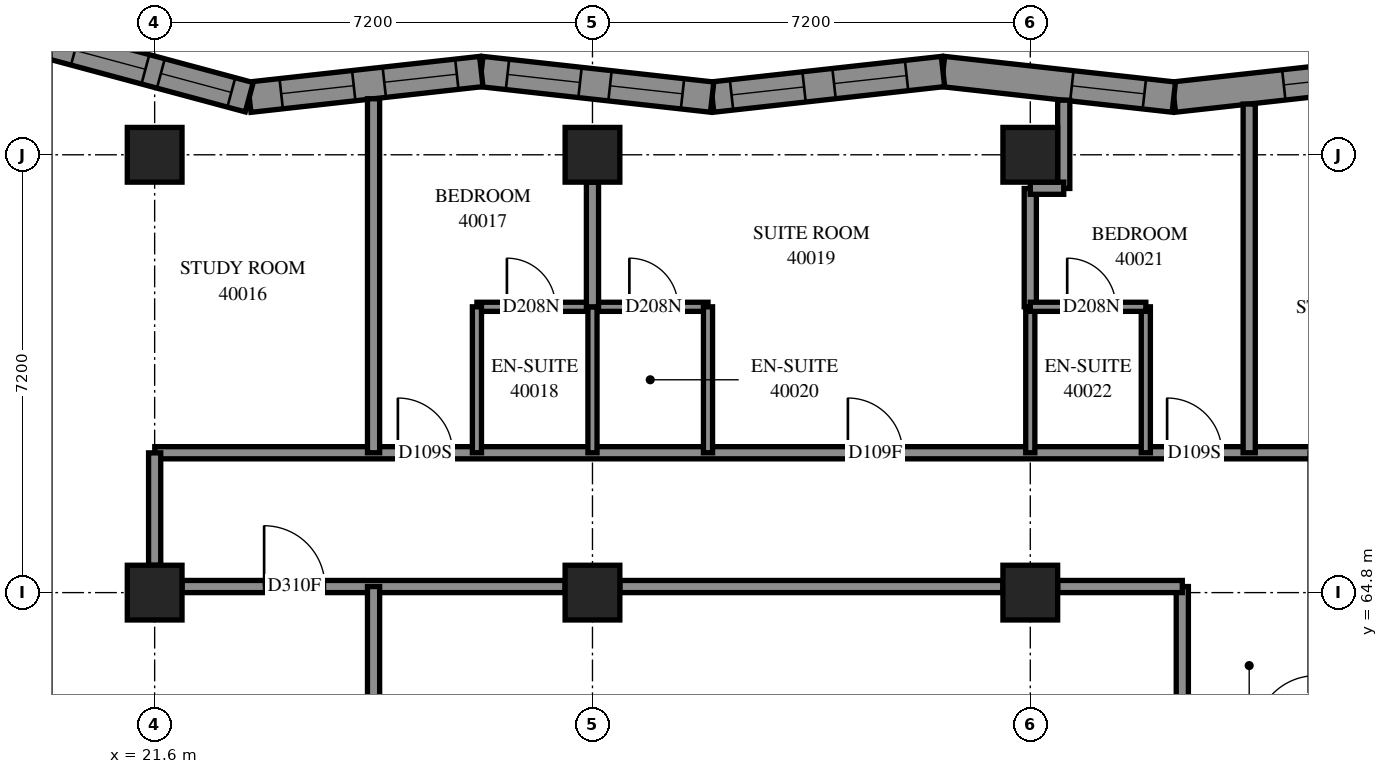
"""IFC4 building model, lengths in metres.
Left out: names, types, materials, properties, quantities, classifications, styles, units other than length and angle.
Written with IfcOpenShell. Run it as: python <this file> out.ifc"""

import sys

from ifc_helpers import new_model, si_unit, direction, frame, frame_2d, origin, origin_2d, place, context, subcontext, project, spatial, polyline, rectangle, outline, extrude, element, fill, save


model = new_model("IFC4")
c1 = context("Model", 3, precision=1e-05, world=origin(), true_north=direction((0.0, 1.0)))
c2 = subcontext(c1, "Body", "Model", "MODEL_VIEW")
j1 = project(units=[si_unit("LENGTHUNIT", "METRE"), si_unit("PLANEANGLEUNIT", "RADIAN")], contexts=[c1])
p1 = place(None, origin())
s1 = spatial("IfcSite", under=j1, at=p1, CompositionType="ELEMENT")
p2 = place(p1, origin())
s2 = spatial("IfcBuilding", under=s1, at=p2, CompositionType="ELEMENT")
p3 = place(p2, frame((0.0, 0.0, 149.0)))
s3 = spatial("IfcBuildingStorey", under=s2, at=p3, CompositionType="ELEMENT", Elevation=149.0)
for number, where, z_axis, x_axis in (
    (1, (21.6, 64.8, 0.0), (0.0, 0.0, 1.0), (1.0, 0.0, 0.0)),
    (2, (21.6, 72.0, 0.0), (0.0, 0.0, 1.0), (1.0, 0.0, 0.0)),
    (3, (28.8, 64.8, 0.0), (0.0, 0.0, 1.0), (1.0, 0.0, 0.0)),
    (4, (28.8, 72.0, 0.0), (0.0, 0.0, 1.0), (1.0, 0.0, 0.0)),
    (5, (36.0, 64.8, 0.0), (0.0, 0.0, 1.0), (1.0, 0.0, 0.0)),
    (6, (36.0, 72.0, 0.0), (0.0, 0.0, 1.0), (1.0, 0.0, 0.0)),
):
    element("IfcColumn", number, at=place(p3, frame(where, z_axis=z_axis, x_axis=x_axis)), inside=s3, PredefinedType="COLUMN", context=c2, shape_type="SweptSolid", body=[
        extrude(rectangle(XDim=0.9, YDim=0.9, at=origin_2d()), origin(), (0.0, 0.0, 1.0), 3.1),
    ])
p4 = place(p3, frame((42.157, 73.37, 0.0), z_axis=(0.0, 0.0, 1.0), x_axis=(-0.99390702, -0.1102217568, 0.0)))
e7 = element("IfcWall", 7, at=p4, inside=s3, PredefinedType="SOLIDWALL", context=c2, shape_type="SweptSolid", body=[
    extrude(outline(polyline([(-0.028, -0.25), (3.792, -0.25), (3.847, 0.25), (0.028, 0.25), (-0.028, -0.25)])), origin(), (0.0, 0.0, 1.0), 3.1),
])
p5 = place(p4, frame((0.8, 0.0, 0.45)))
e8 = element("IfcOpeningElement", 8, at=p5, cuts=e7, PredefinedType="OPENING", context=c2, shape_type="SweptSolid", body=[
    extrude(rectangle(XDim=1.2, YDim=2.5, at=frame_2d((0.6, 1.25))), frame((0.0, 0.26, 0.0), z_axis=(0.0, -1.0, 0.0), x_axis=(1.0, 0.0, 0.0)), (0.0, 0.0, 1.0), 0.52),
])
p6 = place(p3, frame((38.361, 72.948, 0.0), z_axis=(0.0, 0.0, 1.0), x_axis=(-0.99390702, 0.1102217568, 0.0)))
e9 = element("IfcWall", 9, at=p6, inside=s3, PredefinedType="SOLIDWALL", context=c2, shape_type="SweptSolid", body=[
    extrude(outline(polyline([(0.028, -0.25), (3.847, -0.25), (3.792, 0.25), (-0.028, 0.25), (0.028, -0.25)])), origin(), (0.0, 0.0, 1.0), 3.1),
])
p7 = place(p6, frame((0.487, 0.0, 0.45)))
e10 = element("IfcOpeningElement", 10, at=p7, cuts=e9, PredefinedType="OPENING", context=c2, shape_type="SweptSolid", body=[
    extrude(rectangle(XDim=1.2, YDim=2.5, at=frame_2d((0.6, 1.25))), frame((0.0, 0.26, 0.0), z_axis=(0.0, -1.0, 0.0), x_axis=(1.0, 0.0, 0.0)), (0.0, 0.0, 1.0), 0.52),
])
p8 = place(p3, frame((34.564, 73.37, 0.0), z_axis=(0.0, 0.0, 1.0), x_axis=(-0.993907338, -0.1102188888, 0.0)))
e11 = element("IfcWall", 11, at=p8, inside=s3, PredefinedType="SOLIDWALL", context=c2, shape_type="SweptSolid", body=[
    extrude(outline(polyline([(-0.028, -0.25), (3.792, -0.25), (3.847, 0.25), (0.028, 0.25), (-0.028, -0.25)])), origin(), (0.0, 0.0, 1.0), 3.1),
])
p9 = place(p8, frame((0.603, 0.0, 0.45)))
e12 = element("IfcOpeningElement", 12, at=p9, cuts=e11, PredefinedType="OPENING", context=c2, shape_type="SweptSolid", body=[
    extrude(rectangle(XDim=1.2, YDim=2.5, at=frame_2d((0.6, 1.25))), frame((0.0, 0.26, 0.0), z_axis=(0.0, -1.0, 0.0), x_axis=(1.0, 0.0, 0.0)), (0.0, 0.0, 1.0), 0.52),
])
p10 = place(p8, frame((2.299, 0.0, 0.45)))
e13 = element("IfcOpeningElement", 13, at=p10, cuts=e11, PredefinedType="OPENING", context=c2, shape_type="SweptSolid", body=[
    extrude(rectangle(XDim=1.2, YDim=2.5, at=frame_2d((0.6, 1.25))), frame((0.0, 0.26, 0.0), z_axis=(0.0, -1.0, 0.0), x_axis=(1.0, 0.0, 0.0)), (0.0, 0.0, 1.0), 0.52),
])
p11 = place(p3, frame((30.768, 72.948, 0.0), z_axis=(0.0, 0.0, 1.0), x_axis=(-0.99390702, 0.1102217568, 0.0)))
e14 = element("IfcWall", 14, at=p11, inside=s3, PredefinedType="SOLIDWALL", context=c2, shape_type="SweptSolid", body=[
    extrude(outline(polyline([(0.028, -0.25), (3.847, -0.25), (3.792, 0.25), (-0.028, 0.25), (0.028, -0.25)])), origin(), (0.0, 0.0, 1.0), 3.1),
])
p12 = place(p11, frame((0.49, 0.0, 0.45)))
e15 = element("IfcOpeningElement", 15, at=p12, cuts=e14, PredefinedType="OPENING", context=c2, shape_type="SweptSolid", body=[
    extrude(rectangle(XDim=1.2, YDim=2.5, at=frame_2d((0.6, 1.25))), frame((0.0, 0.26, 0.0), z_axis=(0.0, -1.0, 0.0), x_axis=(1.0, 0.0, 0.0)), (0.0, 0.0, 1.0), 0.52),
])
p13 = place(p11, frame((2.186, 0.0, 0.45)))
e16 = element("IfcOpeningElement", 16, at=p13, cuts=e14, PredefinedType="OPENING", context=c2, shape_type="SweptSolid", body=[
    extrude(rectangle(XDim=1.2, YDim=2.5, at=frame_2d((0.6, 1.25))), frame((0.0, 0.26, 0.0), z_axis=(0.0, -1.0, 0.0), x_axis=(1.0, 0.0, 0.0)), (0.0, 0.0, 1.0), 0.52),
])
p14 = place(p3, frame((26.972, 73.37, 0.0), z_axis=(0.0, 0.0, 1.0), x_axis=(-0.9939053168, -0.1102371135, 0.0)))
e17 = element("IfcWall", 17, at=p14, inside=s3, PredefinedType="SOLIDWALL", context=c2, shape_type="SweptSolid", body=[
    extrude(outline(polyline([(-0.028, -0.25), (3.792, -0.25), (3.886, 0.25), (0.028, 0.25), (-0.028, -0.25)])), origin(), (0.0, 0.0, 1.0), 3.1),
])
p15 = place(p14, frame((0.405, 0.0, 0.45)))
e18 = element("IfcOpeningElement", 18, at=p15, cuts=e17, PredefinedType="OPENING", context=c2, shape_type="SweptSolid", body=[
    extrude(rectangle(XDim=1.2, YDim=2.5, at=frame_2d((0.6, 1.25))), frame((0.0, 0.26, 0.0), z_axis=(0.0, -1.0, 0.0), x_axis=(1.0, 0.0, 0.0)), (0.0, 0.0, 1.0), 0.52),
])
p16 = place(p14, frame((2.111, 0.0, 0.45)))
e19 = element("IfcOpeningElement", 19, at=p16, cuts=e17, PredefinedType="OPENING", context=c2, shape_type="SweptSolid", body=[
    extrude(rectangle(XDim=1.2, YDim=2.5, at=frame_2d((0.6, 1.25))), frame((0.0, 0.26, 0.0), z_axis=(0.0, -1.0, 0.0), x_axis=(1.0, 0.0, 0.0)), (0.0, 0.0, 1.0), 0.52),
])
p17 = place(p3, frame((23.156, 72.946, 0.0), z_axis=(0.0, 0.0, 1.0), x_axis=(-0.9656828727, 0.2597240638, 0.0)))
e20 = element("IfcWall", 20, at=p17, inside=s3, PredefinedType="SOLIDWALL", context=c2, shape_type="SweptSolid", body=[
    extrude(outline(polyline([(0.047, -0.25), (3.978, -0.25), (3.326, 0.25), (-0.047, 0.25), (0.047, -0.25)])), origin(), (0.0, 0.0, 1.0), 3.1),
])
p18 = place(p17, frame((0.306, 0.0, 0.45)))
e21 = element("IfcOpeningElement", 21, at=p18, cuts=e20, PredefinedType="OPENING", context=c2, shape_type="SweptSolid", body=[
    extrude(rectangle(XDim=1.2, YDim=2.5, at=frame_2d((0.6, 1.25))), frame((0.0, 0.26, 0.0), z_axis=(0.0, -1.0, 0.0), x_axis=(1.0, 0.0, 0.0)), (0.0, 0.0, 1.0), 0.52),
])
p19 = place(p17, frame((1.769, 0.0, 0.45)))
e22 = element("IfcOpeningElement", 22, at=p19, cuts=e20, PredefinedType="OPENING", context=c2, shape_type="SweptSolid", body=[
    extrude(rectangle(XDim=1.2, YDim=2.5, at=frame_2d((0.6, 1.25))), frame((0.0, 0.26, 0.0), z_axis=(0.0, -1.0, 0.0), x_axis=(1.0, 0.0, 0.0)), (0.0, 0.0, 1.0), 0.52),
])
p20 = place(p3, frame((21.602, 67.1, 0.0), z_axis=(0.0, 0.0, 1.0), x_axis=(1.0, 0.0, 0.0)))
e23 = element("IfcWall", 23, at=p20, inside=s3, PredefinedType="PARTITIONING", context=c2, shape_type="SweptSolid", body=[
    extrude(rectangle(XDim=19.098, YDim=0.2, at=frame_2d((9.549, 0.0))), origin(), (0.0, 0.0, 1.0), 3.1),
])
p21 = place(p20, frame((3.998, 0.0, 0.0)))
e24 = element("IfcOpeningElement", 24, at=p21, cuts=e23, PredefinedType="OPENING", context=c2, shape_type="SweptSolid", body=[
    extrude(rectangle(XDim=0.9, YDim=2.1, at=frame_2d((0.45, 1.05))), frame((0.0, 0.11, 0.0), z_axis=(0.0, -1.0, 0.0), x_axis=(1.0, 0.0, 0.0)), (0.0, 0.0, 1.0), 0.22),
])
p22 = place(p20, frame((11.399, 0.0, 0.0)))
e25 = element("IfcOpeningElement", 25, at=p22, cuts=e23, PredefinedType="OPENING", context=c2, shape_type="SweptSolid", body=[
    extrude(rectangle(XDim=0.9, YDim=2.1, at=frame_2d((0.45, 1.05))), frame((0.0, 0.11, 0.0), z_axis=(0.0, -1.0, 0.0), x_axis=(1.0, 0.0, 0.0)), (0.0, 0.0, 1.0), 0.22),
])
p23 = place(p20, frame((16.648, 0.0, 0.0)))
e26 = element("IfcOpeningElement", 26, at=p23, cuts=e23, PredefinedType="OPENING", context=c2, shape_type="SweptSolid", body=[
    extrude(rectangle(XDim=0.9, YDim=2.1, at=frame_2d((0.45, 1.05))), frame((0.0, 0.11, 0.0), z_axis=(0.0, -1.0, 0.0), x_axis=(1.0, 0.0, 0.0)), (0.0, 0.0, 1.0), 0.22),
])
p24 = place(p3, frame((22.05, 64.9, 0.0), z_axis=(0.0, 0.0, 1.0), x_axis=(1.0, 0.0, 0.0)))
e27 = element("IfcWall", 27, at=p24, inside=s3, PredefinedType="PARTITIONING", context=c2, shape_type="SweptSolid", body=[
    extrude(rectangle(XDim=6.3, YDim=0.2, at=frame_2d((3.15, 0.0))), origin(), (0.0, 0.0, 1.0), 2.6),
])
p25 = place(p24, frame((1.35, 0.0, 0.0)))
e28 = element("IfcOpeningElement", 28, at=p25, cuts=e27, PredefinedType="OPENING", context=c2, shape_type="SweptSolid", body=[
    extrude(rectangle(XDim=1.0, YDim=2.1, at=frame_2d((0.5, 1.05))), frame((0.0, 0.11, 0.0), z_axis=(0.0, -1.0, 0.0), x_axis=(1.0, 0.0, 0.0)), (0.0, 0.0, 1.0), 0.22),
])
p26 = place(p3, frame((29.25, 64.9, 0.0), z_axis=(0.0, 0.0, 1.0), x_axis=(1.0, 0.0, 0.0)))
e29 = element("IfcWall", 29, at=p26, inside=s3, PredefinedType="PARTITIONING", context=c2, shape_type="SweptSolid", body=[
    extrude(rectangle(XDim=6.3, YDim=0.2, at=frame_2d((3.15, 0.0))), origin(), (0.0, 0.0, 1.0), 2.6),
])
p27 = place(p3, frame((25.2, 67.1, 0.0), z_axis=(0.0, 0.0, 1.0), x_axis=(0.0, 1.0, 0.0)))
e30 = element("IfcWall", 30, at=p27, inside=s3, PredefinedType="PARTITIONING", context=c2, shape_type="SweptSolid", body=[
    extrude(rectangle(XDim=5.822, YDim=0.2, at=frame_2d((2.911, 0.0))), origin(), (0.0, 0.0, 1.0), 3.1),
])
p28 = place(p3, frame((39.6, 67.1, 0.0), z_axis=(0.0, 0.0, 1.0), x_axis=(0.0, 1.0, 0.0)))
e31 = element("IfcWall", 31, at=p28, inside=s3, PredefinedType="PARTITIONING", context=c2, shape_type="SweptSolid", body=[
    extrude(rectangle(XDim=5.734, YDim=0.2, at=frame_2d((2.867, 0.0))), origin(), (0.0, 0.0, 1.0), 3.1),
])
p29 = place(p3, frame((26.9, 69.5, 0.0), z_axis=(0.0, 0.0, 1.0), x_axis=(1.0, 0.0, 0.0)))
e32 = element("IfcWall", 32, at=p29, inside=s3, PredefinedType="PARTITIONING", context=c2, shape_type="SweptSolid", body=[
    extrude(rectangle(XDim=3.8, YDim=0.15, at=frame_2d((1.9, 0.0))), origin(), (0.0, 0.0, 1.0), 3.1),
])
p30 = place(p29, frame((0.493, 0.0, 0.0)))
e33 = element("IfcOpeningElement", 33, at=p30, cuts=e32, PredefinedType="OPENING", context=c2, shape_type="SweptSolid", body=[
    extrude(rectangle(XDim=0.8, YDim=2.1, at=frame_2d((0.4, 1.05))), frame((0.0, 0.085, 0.0), z_axis=(0.0, -1.0, 0.0), x_axis=(1.0, 0.0, 0.0)), (0.0, 0.0, 1.0), 0.17),
])
p31 = place(p29, frame((2.507, 0.0, 0.0)))
e34 = element("IfcOpeningElement", 34, at=p31, cuts=e32, PredefinedType="OPENING", context=c2, shape_type="SweptSolid", body=[
    extrude(rectangle(XDim=0.8, YDim=2.1, at=frame_2d((0.4, 1.05))), frame((0.0, 0.085, 0.0), z_axis=(0.0, -1.0, 0.0), x_axis=(1.0, 0.0, 0.0)), (0.0, 0.0, 1.0), 0.17),
])
p32 = place(p3, frame((38.5, 62.302, 0.0), z_axis=(0.0, 0.0, 1.0), x_axis=(0.0, 1.0, 0.0)))
e35 = element("IfcWall", 35, at=p32, inside=s3, PredefinedType="PARTITIONING", context=c2, shape_type="SweptSolid", body=[
    extrude(rectangle(XDim=2.598, YDim=0.2, at=frame_2d((1.299, 0.0))), origin(), (0.0, 0.0, 1.0), 3.1),
])
for number, where, z_axis, x_axis in (
    (36, (26.9, 67.1, 0.0), (0.0, 0.0, 1.0), (0.0, 1.0, 0.0)),
    (37, (28.8, 67.1, 0.0), (0.0, 0.0, 1.0), (0.0, 1.0, 0.0)),
    (38, (30.7, 67.1, 0.0), (0.0, 0.0, 1.0), (0.0, 1.0, 0.0)),
    (39, (36.0, 67.1, 0.0), (0.0, 0.0, 1.0), (0.0, 1.0, 0.0)),
    (40, (37.9, 67.1, 0.0), (0.0, 0.0, 1.0), (0.0, 1.0, 0.0)),
):
    element("IfcWall", number, at=place(p3, frame(where, z_axis=z_axis, x_axis=x_axis)), inside=s3, PredefinedType="PARTITIONING", context=c2, shape_type="SweptSolid", body=[
        extrude(rectangle(XDim=2.4, YDim=0.15, at=frame_2d((1.2, 0.0))), origin(), (0.0, 0.0, 1.0), 3.1),
    ])
for number, where, z_axis, x_axis in (
    (41, (36.45, 64.9, 0.0), (0.0, 0.0, 1.0), (1.0, 0.0, 0.0)),
    (42, (28.8, 69.5, 0.0), (0.0, 0.0, 1.0), (0.0, 1.0, 0.0)),
):
    element("IfcWall", number, at=place(p3, frame(where, z_axis=z_axis, x_axis=x_axis)), inside=s3, PredefinedType="PARTITIONING", context=c2, shape_type="SweptSolid", body=[
        extrude(rectangle(XDim=2.05, YDim=0.2, at=frame_2d((1.025, 0.0))), origin(), (0.0, 0.0, 1.0), 3.1),
    ])
p33 = place(p3, frame((36.0, 69.5, 0.0), z_axis=(0.0, 0.0, 1.0), x_axis=(0.0, 1.0, 0.0)))
e43 = element("IfcWall", 43, at=p33, inside=s3, PredefinedType="PARTITIONING", context=c2, shape_type="SweptSolid", body=[
    extrude(rectangle(XDim=1.946, YDim=0.2, at=frame_2d((0.973, 0.0))), origin(), (0.0, 0.0, 1.0), 3.1),
])
p34 = place(p3, frame((36.0, 69.5, 0.0), z_axis=(0.0, 0.0, 1.0), x_axis=(1.0, 0.0, 0.0)))
e44 = element("IfcWall", 44, at=p34, inside=s3, PredefinedType="PARTITIONING", context=c2, shape_type="SweptSolid", body=[
    extrude(rectangle(XDim=1.9, YDim=0.15, at=frame_2d((0.95, 0.0))), origin(), (0.0, 0.0, 1.0), 3.1),
])
p35 = place(p34, frame((0.607, 0.0, 0.0)))
e45 = element("IfcOpeningElement", 45, at=p35, cuts=e44, PredefinedType="OPENING", context=c2, shape_type="SweptSolid", body=[
    extrude(rectangle(XDim=0.8, YDim=2.1, at=frame_2d((0.4, 1.05))), frame((0.0, 0.085, 0.0), z_axis=(0.0, -1.0, 0.0), x_axis=(1.0, 0.0, 0.0)), (0.0, 0.0, 1.0), 0.17),
])
p36 = place(p3, frame((21.6, 65.25, 0.0), z_axis=(0.0, 0.0, 1.0), x_axis=(0.0, 1.0, 0.0)))
e46 = element("IfcWall", 46, at=p36, inside=s3, PredefinedType="PARTITIONING", context=c2, shape_type="SweptSolid", body=[
    extrude(rectangle(XDim=1.848, YDim=0.2, at=frame_2d((0.924, 0.0))), origin(), (0.0, 0.0, 1.0), 2.6),
])
p37 = place(p3, frame((25.2, 63.079, 0.0), z_axis=(0.0, 0.0, 1.0), x_axis=(0.0, 1.0, 0.0)))
e47 = element("IfcWall", 47, at=p37, inside=s3, PredefinedType="PARTITIONING", context=c2, shape_type="SweptSolid", body=[
    extrude(rectangle(XDim=1.821, YDim=0.2, at=frame_2d((0.91, 0.0))), origin(), (0.0, 0.0, 1.0), 3.1),
])
p38 = place(p3, frame((36.55, 71.446, 0.0), z_axis=(0.0, 0.0, 1.0), x_axis=(0.0, 1.0, 0.0)))
e48 = element("IfcWall", 48, at=p38, inside=s3, PredefinedType="PARTITIONING", context=c2, shape_type="SweptSolid", body=[
    extrude(rectangle(XDim=1.452, YDim=0.2, at=frame_2d((0.726, 0.0))), origin(), (0.0, 0.0, 1.0), 3.1),
])
p39 = place(p3, frame((36.0, 71.45, 0.0), z_axis=(0.0, 0.0, 1.0), x_axis=(1.0, 0.0, 0.0)))
e49 = element("IfcWall", 49, at=p39, inside=s3, PredefinedType="PARTITIONING", context=c2, shape_type="SweptSolid", body=[
    extrude(rectangle(XDim=0.55, YDim=0.2, at=frame_2d((0.275, 0.0))), origin(), (0.0, 0.0, 1.0), 3.1),
])
p40 = place(p5, origin())
e50 = element("IfcWindow", 50, at=p40, inside=s3, PartitioningType="SINGLE_PANEL", PredefinedType="WINDOW", context=c2, shape_type="SweptSolid", body=[
    extrude(rectangle(XDim=1.2, YDim=2.5, at=frame_2d((0.6, 1.25))), frame((0.0, 0.18, 0.0), z_axis=(0.0, -1.0, 0.0), x_axis=(1.0, 0.0, 0.0)), (0.0, 0.0, 1.0), 0.06),
])
fill(e8, e50)
p41 = place(p7, origin())
e51 = element("IfcWindow", 51, at=p41, inside=s3, PartitioningType="SINGLE_PANEL", PredefinedType="WINDOW", context=c2, shape_type="SweptSolid", body=[
    extrude(rectangle(XDim=1.2, YDim=2.5, at=frame_2d((0.6, 1.25))), frame((0.0, 0.18, 0.0), z_axis=(0.0, -1.0, 0.0), x_axis=(1.0, 0.0, 0.0)), (0.0, 0.0, 1.0), 0.06),
])
fill(e10, e51)
p42 = place(p9, origin())
e52 = element("IfcWindow", 52, at=p42, inside=s3, PartitioningType="SINGLE_PANEL", PredefinedType="WINDOW", context=c2, shape_type="SweptSolid", body=[
    extrude(rectangle(XDim=1.2, YDim=2.5, at=frame_2d((0.6, 1.25))), frame((0.0, 0.18, 0.0), z_axis=(0.0, -1.0, 0.0), x_axis=(1.0, 0.0, 0.0)), (0.0, 0.0, 1.0), 0.06),
])
fill(e12, e52)
p43 = place(p10, origin())
e53 = element("IfcWindow", 53, at=p43, inside=s3, PartitioningType="SINGLE_PANEL", PredefinedType="WINDOW", context=c2, shape_type="SweptSolid", body=[
    extrude(rectangle(XDim=1.2, YDim=2.5, at=frame_2d((0.6, 1.25))), frame((0.0, 0.18, 0.0), z_axis=(0.0, -1.0, 0.0), x_axis=(1.0, 0.0, 0.0)), (0.0, 0.0, 1.0), 0.06),
])
fill(e13, e53)
p44 = place(p12, origin())
e54 = element("IfcWindow", 54, at=p44, inside=s3, PartitioningType="SINGLE_PANEL", PredefinedType="WINDOW", context=c2, shape_type="SweptSolid", body=[
    extrude(rectangle(XDim=1.2, YDim=2.5, at=frame_2d((0.6, 1.25))), frame((0.0, 0.18, 0.0), z_axis=(0.0, -1.0, 0.0), x_axis=(1.0, 0.0, 0.0)), (0.0, 0.0, 1.0), 0.06),
])
fill(e15, e54)
p45 = place(p13, origin())
e55 = element("IfcWindow", 55, at=p45, inside=s3, PartitioningType="SINGLE_PANEL", PredefinedType="WINDOW", context=c2, shape_type="SweptSolid", body=[
    extrude(rectangle(XDim=1.2, YDim=2.5, at=frame_2d((0.6, 1.25))), frame((0.0, 0.18, 0.0), z_axis=(0.0, -1.0, 0.0), x_axis=(1.0, 0.0, 0.0)), (0.0, 0.0, 1.0), 0.06),
])
fill(e16, e55)
p46 = place(p15, origin())
e56 = element("IfcWindow", 56, at=p46, inside=s3, PartitioningType="SINGLE_PANEL", PredefinedType="WINDOW", context=c2, shape_type="SweptSolid", body=[
    extrude(rectangle(XDim=1.2, YDim=2.5, at=frame_2d((0.6, 1.25))), frame((0.0, 0.18, 0.0), z_axis=(0.0, -1.0, 0.0), x_axis=(1.0, 0.0, 0.0)), (0.0, 0.0, 1.0), 0.06),
])
fill(e18, e56)
p47 = place(p16, origin())
e57 = element("IfcWindow", 57, at=p47, inside=s3, PartitioningType="SINGLE_PANEL", PredefinedType="WINDOW", context=c2, shape_type="SweptSolid", body=[
    extrude(rectangle(XDim=1.2, YDim=2.5, at=frame_2d((0.6, 1.25))), frame((0.0, 0.18, 0.0), z_axis=(0.0, -1.0, 0.0), x_axis=(1.0, 0.0, 0.0)), (0.0, 0.0, 1.0), 0.06),
])
fill(e19, e57)
p48 = place(p18, origin())
e58 = element("IfcWindow", 58, at=p48, inside=s3, PartitioningType="SINGLE_PANEL", PredefinedType="WINDOW", context=c2, shape_type="SweptSolid", body=[
    extrude(rectangle(XDim=1.2, YDim=2.5, at=frame_2d((0.6, 1.25))), frame((0.0, 0.18, 0.0), z_axis=(0.0, -1.0, 0.0), x_axis=(1.0, 0.0, 0.0)), (0.0, 0.0, 1.0), 0.06),
])
fill(e21, e58)
p49 = place(p19, origin())
e59 = element("IfcWindow", 59, at=p49, inside=s3, PartitioningType="SINGLE_PANEL", PredefinedType="WINDOW", context=c2, shape_type="SweptSolid", body=[
    extrude(rectangle(XDim=1.2, YDim=2.5, at=frame_2d((0.6, 1.25))), frame((0.0, 0.18, 0.0), z_axis=(0.0, -1.0, 0.0), x_axis=(1.0, 0.0, 0.0)), (0.0, 0.0, 1.0), 0.06),
])
fill(e22, e59)
p50 = place(p25, origin())
e60 = element("IfcDoor", 60, at=p50, inside=s3, OperationType="SINGLE_SWING_RIGHT", PredefinedType="DOOR", context=c2, shape_type="SweptSolid", body=[
    extrude(rectangle(XDim=1.0, YDim=2.1, at=frame_2d((0.5, 1.05))), frame((0.0, 0.025, 0.0), z_axis=(0.0, -1.0, 0.0), x_axis=(1.0, 0.0, 0.0)), (0.0, 0.0, 1.0), 0.05),
])
fill(e28, e60)
p51 = place(p21, origin())
e61 = element("IfcDoor", 61, at=p51, inside=s3, OperationType="SINGLE_SWING_LEFT", PredefinedType="DOOR", context=c2, shape_type="SweptSolid", body=[
    extrude(rectangle(XDim=0.9, YDim=2.1, at=frame_2d((0.45, 1.05))), frame((0.0, 0.025, 0.0), z_axis=(0.0, -1.0, 0.0), x_axis=(1.0, 0.0, 0.0)), (0.0, 0.0, 1.0), 0.05),
])
fill(e24, e61)
p52 = place(p30, origin())
e62 = element("IfcDoor", 62, at=p52, inside=s3, OperationType="SINGLE_SWING_RIGHT", PredefinedType="DOOR", context=c2, shape_type="SweptSolid", body=[
    extrude(rectangle(XDim=0.8, YDim=2.1, at=frame_2d((0.4, 1.05))), frame((0.0, 0.025, 0.0), z_axis=(0.0, -1.0, 0.0), x_axis=(1.0, 0.0, 0.0)), (0.0, 0.0, 1.0), 0.05),
])
fill(e33, e62)
p53 = place(p22, origin())
e63 = element("IfcDoor", 63, at=p53, inside=s3, OperationType="SINGLE_SWING_RIGHT", PredefinedType="DOOR", context=c2, shape_type="SweptSolid", body=[
    extrude(rectangle(XDim=0.9, YDim=2.1, at=frame_2d((0.45, 1.05))), frame((0.0, 0.025, 0.0), z_axis=(0.0, -1.0, 0.0), x_axis=(1.0, 0.0, 0.0)), (0.0, 0.0, 1.0), 0.05),
])
fill(e25, e63)
p54 = place(p31, origin())
e64 = element("IfcDoor", 64, at=p54, inside=s3, OperationType="SINGLE_SWING_RIGHT", PredefinedType="DOOR", context=c2, shape_type="SweptSolid", body=[
    extrude(rectangle(XDim=0.8, YDim=2.1, at=frame_2d((0.4, 1.05))), frame((0.0, 0.025, 0.0), z_axis=(0.0, -1.0, 0.0), x_axis=(1.0, 0.0, 0.0)), (0.0, 0.0, 1.0), 0.05),
])
fill(e34, e64)
p55 = place(p23, origin())
e65 = element("IfcDoor", 65, at=p55, inside=s3, OperationType="SINGLE_SWING_RIGHT", PredefinedType="DOOR", context=c2, shape_type="SweptSolid", body=[
    extrude(rectangle(XDim=0.9, YDim=2.1, at=frame_2d((0.45, 1.05))), frame((0.0, 0.025, 0.0), z_axis=(0.0, -1.0, 0.0), x_axis=(1.0, 0.0, 0.0)), (0.0, 0.0, 1.0), 0.05),
])
fill(e26, e65)
p56 = place(p35, origin())
e66 = element("IfcDoor", 66, at=p56, inside=s3, OperationType="SINGLE_SWING_RIGHT", PredefinedType="DOOR", context=c2, shape_type="SweptSolid", body=[
    extrude(rectangle(XDim=0.8, YDim=2.1, at=frame_2d((0.4, 1.05))), frame((0.0, 0.025, 0.0), z_axis=(0.0, -1.0, 0.0), x_axis=(1.0, 0.0, 0.0)), (0.0, 0.0, 1.0), 0.05),
])
fill(e45, e66)
save(model, sys.argv[1])
